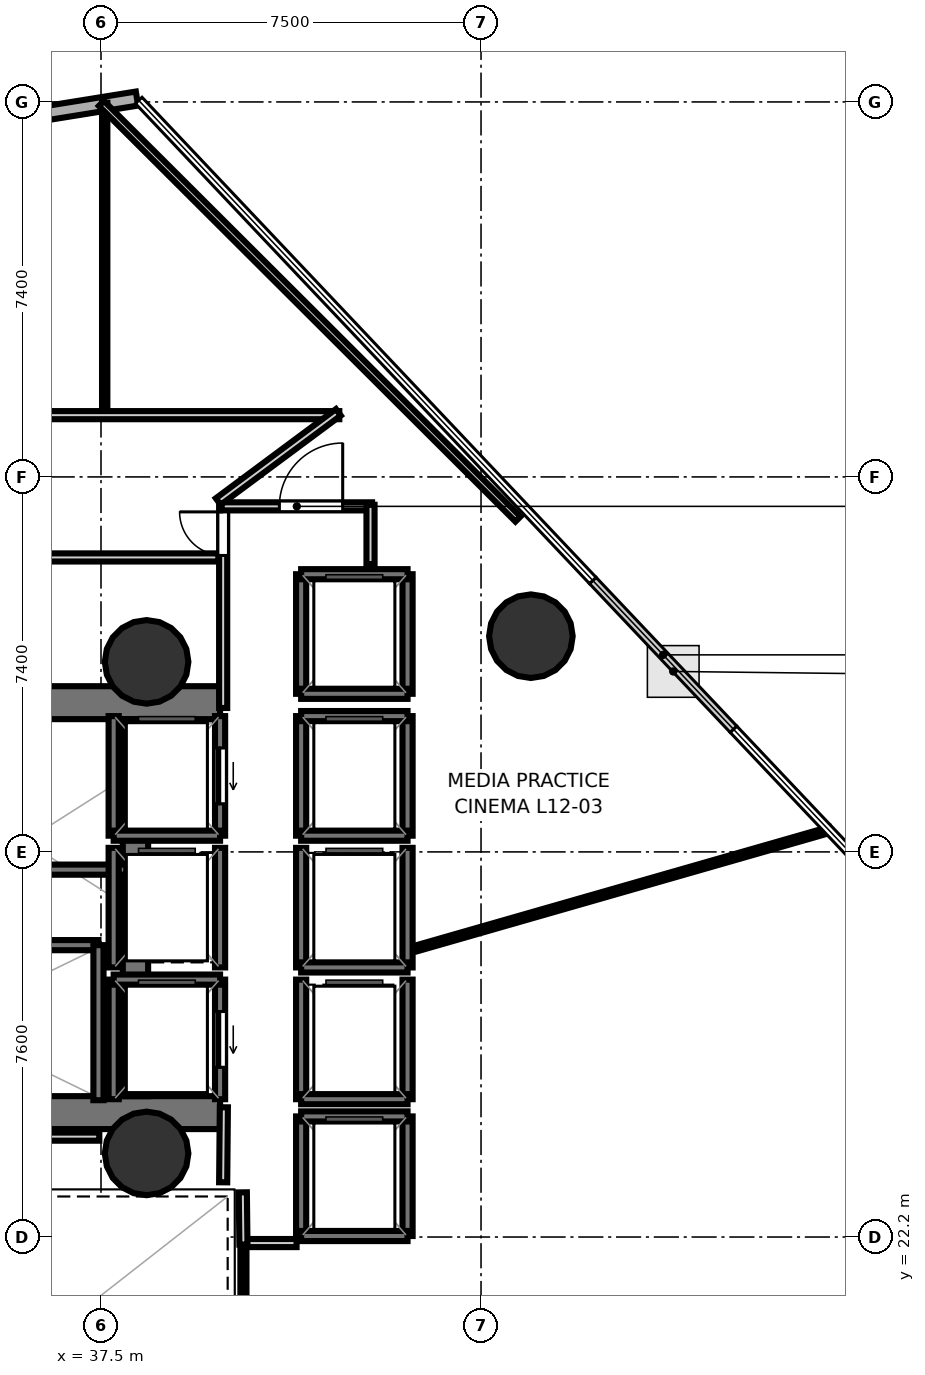
"""IFC4 building model, lengths in metres.
Left out: names, types, materials, properties, quantities, classifications, styles, units other than length and angle.
Written with IfcOpenShell. Run it as: python <this file> out.ifc"""

import sys

from ifc_helpers import new_model, si_unit, direction, frame, frame_2d, origin, origin_2d, place, context, subcontext, project, spatial, rectangle, hollow_circle, extrude, element, fill, save


model = new_model("IFC4")
c1 = context("Model", 3, precision=1e-05, world=origin(), true_north=direction((0.0, 1.0)))
c2 = subcontext(c1, "Body", "Model", "MODEL_VIEW")
j1 = project(units=[si_unit("LENGTHUNIT", "METRE"), si_unit("PLANEANGLEUNIT", "RADIAN")], contexts=[c1])
p1 = place(None, origin())
s1 = spatial("IfcSite", under=j1, at=p1, CompositionType="ELEMENT")
p2 = place(p1, origin())
s2 = spatial("IfcBuilding", under=s1, at=p2, CompositionType="ELEMENT")
p3 = place(p2, frame((0.0, 0.0, 52.5)))
s3 = spatial("IfcBuildingStorey", under=s2, at=p3, CompositionType="ELEMENT", Elevation=52.5)
p4 = place(p3, frame((29.13, 32.745, 0.0), z_axis=(0.0, 0.0, 1.0), x_axis=(1.0, 0.0, 0.0)))
e1 = element("IfcWall", 1, at=p4, inside=s3, PredefinedType="SHEAR", context=c2, shape_type="SweptSolid", body=[
    extrude(rectangle(XDim=10.72, YDim=0.65, at=frame_2d((5.36, 0.0))), origin(), (0.0, 0.0, 1.0), 3.52),
])
p5 = place(p4, frame((1.095, 0.0, 0.0)))
e2 = element("IfcOpeningElement", 2, at=p5, cuts=e1, PredefinedType="OPENING", context=c2, shape_type="SweptSolid", body=[
    extrude(rectangle(XDim=1.25, YDim=2.15, at=frame_2d((0.625, 1.075))), frame((0.0, 0.335, 0.0), z_axis=(0.0, -1.0, 0.0), x_axis=(1.0, 0.0, 0.0)), (0.0, 0.0, 1.0), 0.67),
])
p6 = place(p3, frame((29.13, 24.655, 0.0), z_axis=(0.0, 0.0, 1.0), x_axis=(1.0, 0.0, 0.0)))
e3 = element("IfcWall", 3, at=p6, inside=s3, PredefinedType="SHEAR", context=c2, shape_type="SweptSolid", body=[
    extrude(rectangle(XDim=10.72, YDim=0.65, at=frame_2d((5.36, 0.0))), origin(), (0.0, 0.0, 1.0), 3.52),
])
p7 = place(p6, frame((0.895, 0.0, 0.0)))
e4 = element("IfcOpeningElement", 4, at=p7, cuts=e3, PredefinedType="OPENING", context=c2, shape_type="SweptSolid", body=[
    extrude(rectangle(XDim=1.25, YDim=2.15, at=frame_2d((0.625, 1.075))), frame((0.0, 0.335, 0.0), z_axis=(0.0, -1.0, 0.0), x_axis=(1.0, 0.0, 0.0)), (0.0, 0.0, 1.0), 0.67),
])
p8 = place(p3, frame((38.18, 24.98, 0.0), z_axis=(0.0, 0.0, 1.0), x_axis=(0.0, 1.0, 0.0)))
e5 = element("IfcWall", 5, at=p8, inside=s3, PredefinedType="SHEAR", context=c2, shape_type="SweptSolid", body=[
    extrude(rectangle(XDim=7.44, YDim=0.5, at=frame_2d((3.72, 0.0))), origin(), (0.0, 0.0, 1.0), 3.52),
])
for number, where, z_axis, x_axis in (
    (6, (38.4, 33.55, 0.0), (0.0, 0.0, 1.0), (1.0, 0.0, 0.0)),
    (7, (38.4, 23.85, 0.0), (0.0, 0.0, 1.0), (1.0, 0.0, 0.0)),
):
    element("IfcColumn", number, at=place(p3, frame(where, z_axis=z_axis, x_axis=x_axis)), inside=s3, PredefinedType="COLUMN", context=c2, shape_type="SweptSolid", body=[
        extrude(hollow_circle(Radius=0.825, WallThickness=0.04, at=origin_2d()), origin(), (0.0, 0.0, 1.0), 3.7),
    ])
p9 = place(p3, frame((45.984, 34.057, -0.23), z_axis=(0.0, 0.0, 1.0), x_axis=(1.0, 0.0, 0.0)))
e8 = element("IfcColumn", 8, at=p9, inside=s3, PredefinedType="COLUMN", context=c2, shape_type="SweptSolid", body=[
    extrude(hollow_circle(Radius=0.825, WallThickness=0.04, at=origin_2d()), origin(), (0.0, 0.0, 1.0), 3.93),
])
p10 = place(p3, frame((38.21, 44.667, 0.0), z_axis=(0.0, 0.0, 1.0), x_axis=(-0.987285743685, -0.158955529366, 0.0)))
e9 = element("IfcWall", 9, at=p10, inside=s3, PredefinedType="SOLIDWALL", context=c2, shape_type="SweptSolid", body=[
    extrude(rectangle(XDim=12.668, YDim=0.28, at=frame_2d((6.334, 0.0))), origin(), (0.0, 0.0, 1.0), 3.52),
])
p11 = place(p10, frame((2.9, 0.0, 0.85)))
e10 = element("IfcOpeningElement", 10, at=p11, cuts=e9, PredefinedType="OPENING", context=c2, shape_type="SweptSolid", body=[
    extrude(rectangle(XDim=1.8, YDim=2.1, at=frame_2d((0.9, 1.05))), frame((0.0, 0.15, 0.0), z_axis=(0.0, -1.0, 0.0), x_axis=(1.0, 0.0, 0.0)), (0.0, 0.0, 1.0), 0.3),
])
p12 = place(p10, frame((7.968, 0.0, 0.85)))
e11 = element("IfcOpeningElement", 11, at=p12, cuts=e9, PredefinedType="OPENING", context=c2, shape_type="SweptSolid", body=[
    extrude(rectangle(XDim=1.8, YDim=2.1, at=frame_2d((0.9, 1.05))), frame((0.0, 0.15, 0.0), z_axis=(0.0, -1.0, 0.0), x_axis=(1.0, 0.0, 0.0)), (0.0, 0.0, 1.0), 0.3),
])
p13 = place(p3, frame((29.7, 29.45, 0.0), z_axis=(0.0, 0.0, 1.0), x_axis=(1.0, 0.0, 0.0)))
e12 = element("IfcWall", 12, at=p13, inside=s3, PredefinedType="SOLIDWALL", context=c2, shape_type="SweptSolid", body=[
    extrude(rectangle(XDim=8.3, YDim=0.2, at=frame_2d((4.15, 0.0))), origin(), (0.0, 0.0, 1.0), 3.52),
])
p14 = place(p3, frame((29.7, 27.96, 0.0), z_axis=(0.0, 0.0, 1.0), x_axis=(1.0, 0.0, 0.0)))
e13 = element("IfcWall", 13, at=p14, inside=s3, PredefinedType="SOLIDWALL", context=c2, shape_type="SweptSolid", body=[
    extrude(rectangle(XDim=7.75, YDim=0.2, at=frame_2d((3.875, 0.0))), origin(), (0.0, 0.0, 1.0), 3.52),
])
p15 = place(p3, frame((37.45, 24.9, 0.0), z_axis=(0.0, 0.0, 1.0), x_axis=(0.0, 1.0, 0.0)))
e14 = element("IfcWall", 14, at=p15, inside=s3, PredefinedType="SOLIDWALL", context=c2, shape_type="SweptSolid", body=[
    extrude(rectangle(XDim=3.06, YDim=0.2, at=frame_2d((1.53, 0.0))), origin(), (0.0, 0.0, 1.0), 3.52),
])
p16 = place(p3, frame((39.85, 30.12, 0.0), z_axis=(0.0, 0.0, 1.0), x_axis=(0.0, 1.0, 0.0)))
e15 = element("IfcWall", 15, at=p16, inside=s3, PredefinedType="SOLIDWALL", context=c2, shape_type="SweptSolid", body=[
    extrude(rectangle(XDim=2.36, YDim=0.2, at=frame_2d((1.18, 0.0))), origin(), (0.0, 0.0, 1.0), 3.52),
])
p17 = place(p16, frame((0.63, 0.0, 0.0)))
e16 = element("IfcOpeningElement", 16, at=p17, cuts=e15, PredefinedType="OPENING", context=c2, shape_type="SweptSolid", body=[
    extrude(rectangle(XDim=1.1, YDim=2.15, at=frame_2d((0.55, 1.075))), frame((0.0, 0.11, 0.0), z_axis=(0.0, -1.0, 0.0), x_axis=(1.0, 0.0, 0.0)), (0.0, 0.0, 1.0), 0.22),
])
p18 = place(p3, frame((37.75, 30.12, 0.0), z_axis=(0.0, 0.0, 1.0), x_axis=(0.0, 1.0, 0.0)))
e17 = element("IfcWall", 17, at=p18, inside=s3, PredefinedType="SOLIDWALL", context=c2, shape_type="SweptSolid", body=[
    extrude(rectangle(XDim=2.36, YDim=0.2, at=frame_2d((1.18, 0.0))), origin(), (0.0, 0.0, 1.0), 3.52),
])
p19 = place(p3, frame((37.75, 30.12, 0.0), z_axis=(0.0, 0.0, 1.0), x_axis=(1.0, 0.0, 0.0)))
e18 = element("IfcWall", 18, at=p19, inside=s3, PredefinedType="SOLIDWALL", context=c2, shape_type="SweptSolid", body=[
    extrude(rectangle(XDim=2.1, YDim=0.2, at=frame_2d((1.05, 0.0))), origin(), (0.0, 0.0, 1.0), 3.52),
])
p20 = place(p3, frame((39.85, 24.92, 0.0), z_axis=(0.0, 0.0, 1.0), x_axis=(0.0, 1.0, 0.0)))
e19 = element("IfcWall", 19, at=p20, inside=s3, PredefinedType="SOLIDWALL", context=c2, shape_type="SweptSolid", body=[
    extrude(rectangle(XDim=2.36, YDim=0.2, at=frame_2d((1.18, 0.0))), origin(), (0.0, 0.0, 1.0), 3.52),
])
p21 = place(p20, frame((0.63, 0.0, 0.0)))
e20 = element("IfcOpeningElement", 20, at=p21, cuts=e19, PredefinedType="OPENING", context=c2, shape_type="SweptSolid", body=[
    extrude(rectangle(XDim=1.1, YDim=2.15, at=frame_2d((0.55, 1.075))), frame((0.0, 0.11, 0.0), z_axis=(0.0, -1.0, 0.0), x_axis=(1.0, 0.0, 0.0)), (0.0, 0.0, 1.0), 0.22),
])
p22 = place(p3, frame((37.75, 24.92, 0.0), z_axis=(0.0, 0.0, 1.0), x_axis=(0.0, 1.0, 0.0)))
e21 = element("IfcWall", 21, at=p22, inside=s3, PredefinedType="SOLIDWALL", context=c2, shape_type="SweptSolid", body=[
    extrude(rectangle(XDim=2.36, YDim=0.2, at=frame_2d((1.18, 0.0))), origin(), (0.0, 0.0, 1.0), 3.52),
])
p23 = place(p3, frame((37.75, 27.28, 0.0), z_axis=(0.0, 0.0, 1.0), x_axis=(1.0, 0.0, 0.0)))
e22 = element("IfcWall", 22, at=p23, inside=s3, PredefinedType="SOLIDWALL", context=c2, shape_type="SweptSolid", body=[
    extrude(rectangle(XDim=2.1, YDim=0.2, at=frame_2d((1.05, 0.0))), origin(), (0.0, 0.0, 1.0), 3.52),
])
for number, where, z_axis, x_axis in (
    (23, (43.55, 30.12, 0.0), (0.0, 0.0, 1.0), (0.0, 1.0, 0.0)),
    (24, (41.45, 30.12, 0.0), (0.0, 0.0, 1.0), (0.0, 1.0, 0.0)),
):
    element("IfcWall", number, at=place(p3, frame(where, z_axis=z_axis, x_axis=x_axis)), inside=s3, PredefinedType="SOLIDWALL", context=c2, shape_type="SweptSolid", body=[
        extrude(rectangle(XDim=2.36, YDim=0.2, at=frame_2d((1.18, 0.0))), origin(), (0.0, 0.0, 1.0), 3.52),
    ])
for number, where, z_axis, x_axis in (
    (25, (41.45, 32.48, 0.0), (0.0, 0.0, 1.0), (1.0, 0.0, 0.0)),
    (26, (41.45, 30.12, 0.0), (0.0, 0.0, 1.0), (1.0, 0.0, 0.0)),
):
    element("IfcWall", number, at=place(p3, frame(where, z_axis=z_axis, x_axis=x_axis)), inside=s3, PredefinedType="SOLIDWALL", context=c2, shape_type="SweptSolid", body=[
        extrude(rectangle(XDim=2.1, YDim=0.2, at=frame_2d((1.05, 0.0))), origin(), (0.0, 0.0, 1.0), 3.52),
    ])
for number, where, z_axis, x_axis in (
    (27, (43.55, 27.52, 0.0), (0.0, 0.0, 1.0), (0.0, 1.0, 0.0)),
    (28, (41.45, 27.52, 0.0), (0.0, 0.0, 1.0), (0.0, 1.0, 0.0)),
):
    element("IfcWall", number, at=place(p3, frame(where, z_axis=z_axis, x_axis=x_axis)), inside=s3, PredefinedType="SOLIDWALL", context=c2, shape_type="SweptSolid", body=[
        extrude(rectangle(XDim=2.36, YDim=0.2, at=frame_2d((1.18, 0.0))), origin(), (0.0, 0.0, 1.0), 3.52),
    ])
p24 = place(p3, frame((41.45, 27.52, 0.0), z_axis=(0.0, 0.0, 1.0), x_axis=(1.0, 0.0, 0.0)))
e29 = element("IfcWall", 29, at=p24, inside=s3, PredefinedType="SOLIDWALL", context=c2, shape_type="SweptSolid", body=[
    extrude(rectangle(XDim=2.1, YDim=0.2, at=frame_2d((1.05, 0.0))), origin(), (0.0, 0.0, 1.0), 3.52),
])
for number, where, z_axis, x_axis in (
    (30, (43.55, 24.92, 0.0), (0.0, 0.0, 1.0), (0.0, 1.0, 0.0)),
    (31, (41.45, 24.92, 0.0), (0.0, 0.0, 1.0), (0.0, 1.0, 0.0)),
):
    element("IfcWall", number, at=place(p3, frame(where, z_axis=z_axis, x_axis=x_axis)), inside=s3, PredefinedType="SOLIDWALL", context=c2, shape_type="SweptSolid", body=[
        extrude(rectangle(XDim=2.36, YDim=0.2, at=frame_2d((1.18, 0.0))), origin(), (0.0, 0.0, 1.0), 3.52),
    ])
p25 = place(p3, frame((41.45, 24.92, 0.0), z_axis=(0.0, 0.0, 1.0), x_axis=(1.0, 0.0, 0.0)))
e32 = element("IfcWall", 32, at=p25, inside=s3, PredefinedType="SOLIDWALL", context=c2, shape_type="SweptSolid", body=[
    extrude(rectangle(XDim=2.1, YDim=0.2, at=frame_2d((1.05, 0.0))), origin(), (0.0, 0.0, 1.0), 3.52),
])
for number, where, z_axis, x_axis in (
    (33, (39.85, 27.52, 0.0), (0.0, 0.0, 1.0), (0.0, 1.0, 0.0)),
    (34, (37.75, 27.52, 0.0), (0.0, 0.0, 1.0), (0.0, 1.0, 0.0)),
):
    element("IfcWall", number, at=place(p3, frame(where, z_axis=z_axis, x_axis=x_axis)), inside=s3, PredefinedType="SOLIDWALL", context=c2, shape_type="SweptSolid", body=[
        extrude(rectangle(XDim=2.36, YDim=0.2, at=frame_2d((1.18, 0.0))), origin(), (0.0, 0.0, 1.0), 3.52),
    ])
for number, where, z_axis, x_axis in (
    (35, (43.55, 22.22, 0.0), (0.0, 0.0, 1.0), (0.0, 1.0, 0.0)),
    (36, (41.45, 22.22, 0.0), (0.0, 0.0, 1.0), (0.0, 1.0, 0.0)),
):
    element("IfcWall", number, at=place(p3, frame(where, z_axis=z_axis, x_axis=x_axis)), inside=s3, PredefinedType="SOLIDWALL", context=c2, shape_type="SweptSolid", body=[
        extrude(rectangle(XDim=2.36, YDim=0.2, at=frame_2d((1.18, 0.0))), origin(), (0.0, 0.0, 1.0), 3.52),
    ])
for number, where, z_axis, x_axis in (
    (37, (41.45, 24.58, 0.0), (0.0, 0.0, 1.0), (1.0, 0.0, 0.0)),
    (38, (41.45, 22.22, 0.0), (0.0, 0.0, 1.0), (1.0, 0.0, 0.0)),
):
    element("IfcWall", number, at=place(p3, frame(where, z_axis=z_axis, x_axis=x_axis)), inside=s3, PredefinedType="SOLIDWALL", context=c2, shape_type="SweptSolid", body=[
        extrude(rectangle(XDim=2.1, YDim=0.2, at=frame_2d((1.05, 0.0))), origin(), (0.0, 0.0, 1.0), 3.52),
    ])
for number, where, z_axis, x_axis in (
    (39, (43.55, 32.92, 0.0), (0.0, 0.0, 1.0), (0.0, 1.0, 0.0)),
    (40, (41.45, 32.92, 0.0), (0.0, 0.0, 1.0), (0.0, 1.0, 0.0)),
):
    element("IfcWall", number, at=place(p3, frame(where, z_axis=z_axis, x_axis=x_axis)), inside=s3, PredefinedType="SOLIDWALL", context=c2, shape_type="SweptSolid", body=[
        extrude(rectangle(XDim=2.36, YDim=0.2, at=frame_2d((1.18, 0.0))), origin(), (0.0, 0.0, 1.0), 3.52),
    ])
for number, where, z_axis, x_axis in (
    (41, (41.45, 35.28, 0.0), (0.0, 0.0, 1.0), (1.0, 0.0, 0.0)),
    (42, (41.45, 32.92, 0.0), (0.0, 0.0, 1.0), (1.0, 0.0, 0.0)),
):
    element("IfcWall", number, at=place(p3, frame(where, z_axis=z_axis, x_axis=x_axis)), inside=s3, PredefinedType="SOLIDWALL", context=c2, shape_type="SweptSolid", body=[
        extrude(rectangle(XDim=2.1, YDim=0.2, at=frame_2d((1.05, 0.0))), origin(), (0.0, 0.0, 1.0), 3.52),
    ])
p26 = place(p3, frame((39.911, 32.64, 0.0), z_axis=(0.0, 0.0, 1.0), x_axis=(0.0, 1.0, 0.0)))
e43 = element("IfcWall", 43, at=p26, inside=s3, PredefinedType="PARTITIONING", context=c2, shape_type="SweptSolid", body=[
    extrude(rectangle(XDim=4.01, YDim=0.16, at=frame_2d((2.005, 0.0))), origin(), (0.0, 0.0, 1.0), 2.84),
])
p27 = place(p26, frame((3.01, 0.0, 0.0)))
e44 = element("IfcOpeningElement", 44, at=p27, cuts=e43, PredefinedType="OPENING", context=c2, shape_type="SweptSolid", body=[
    extrude(rectangle(XDim=0.86, YDim=2.05, at=frame_2d((0.43, 1.025))), frame((0.0, 0.09, 0.0), z_axis=(0.0, -1.0, 0.0), x_axis=(1.0, 0.0, 0.0)), (0.0, 0.0, 1.0), 0.18),
])
p28 = place(p3, frame((39.88, 36.619, 0.0), z_axis=(0.0, 0.0, 1.0), x_axis=(1.0, 0.0, 0.0)))
e45 = element("IfcWall", 45, at=p28, inside=s3, PredefinedType="PARTITIONING", context=c2, shape_type="SweptSolid", body=[
    extrude(rectangle(XDim=2.97, YDim=0.16, at=frame_2d((1.485, 0.0))), origin(), (0.0, 0.0, 1.0), 2.798),
])
p29 = place(p28, frame((1.14, 0.0, 0.0)))
e46 = element("IfcOpeningElement", 46, at=p29, cuts=e45, PredefinedType="OPENING", context=c2, shape_type="SweptSolid", body=[
    extrude(rectangle(XDim=1.25, YDim=2.2, at=frame_2d((0.625, 1.1))), frame((0.0, 0.09, 0.0), z_axis=(0.0, -1.0, 0.0), x_axis=(1.0, 0.0, 0.0)), (0.0, 0.0, 1.0), 0.18),
])
p30 = place(p3, frame((42.819, 36.65, 0.0), z_axis=(0.0, 0.0, 1.0), x_axis=(0.0, -1.0, 0.0)))
e47 = element("IfcWall", 47, at=p30, inside=s3, PredefinedType="PARTITIONING", context=c2, shape_type="SweptSolid", body=[
    extrude(rectangle(XDim=1.17, YDim=0.16, at=frame_2d((0.585, 0.0))), origin(), (0.0, 0.0, 1.0), 2.798),
])
p31 = place(p3, frame((41.36, 22.081, 0.0), z_axis=(0.0, 0.0, 1.0), x_axis=(-1.0, 0.0, 0.0)))
e48 = element("IfcWall", 48, at=p31, inside=s3, PredefinedType="PARTITIONING", context=c2, shape_type="SweptSolid", body=[
    extrude(rectangle(XDim=1.08, YDim=0.16, at=frame_2d((0.54, 0.0))), origin(), (0.0, 0.0, 1.0), 2.84),
])
p32 = place(p3, frame((40.311, 22.05, 0.0), z_axis=(0.0, 0.0, 1.0), x_axis=(-0.011836292006, 0.999929948642, 0.0)))
e49 = element("IfcWall", 49, at=p32, inside=s3, PredefinedType="PARTITIONING", context=c2, shape_type="SweptSolid", body=[
    extrude(rectangle(XDim=1.031, YDim=0.16, at=frame_2d((0.516, 0.0))), origin(), (0.0, 0.0, 1.0), 2.84),
])
p33 = place(p3, frame((39.911, 23.28, 0.0), z_axis=(0.0, 0.0, 1.0), x_axis=(0.009397771291, 0.999955839972, 0.0)))
e50 = element("IfcWall", 50, at=p33, inside=s3, PredefinedType="PARTITIONING", context=c2, shape_type="SweptSolid", body=[
    extrude(rectangle(XDim=1.481, YDim=0.16, at=frame_2d((0.74, 0.0))), origin(), (0.0, 0.0, 1.0), 2.84),
])
p34 = place(p3, frame((37.467, 24.181, 0.0), z_axis=(0.0, 0.0, 1.0), x_axis=(-1.0, 0.0, 0.0)))
e51 = element("IfcWall", 51, at=p34, inside=s3, PredefinedType="PARTITIONING", context=c2, shape_type="SweptSolid", body=[
    extrude(rectangle(XDim=3.937, YDim=0.16, at=frame_2d((1.968, 0.0))), origin(), (0.0, 0.0, 1.0), 2.84),
])
p35 = place(p3, frame((26.42, 38.419, 0.0), z_axis=(0.0, 0.0, 1.0), x_axis=(1.0, 0.0, 0.0)))
e52 = element("IfcWall", 52, at=p35, inside=s3, PredefinedType="PARTITIONING", context=c2, shape_type="SweptSolid", body=[
    extrude(rectangle(XDim=15.783, YDim=0.16, at=frame_2d((7.892, 0.0))), origin(), (0.0, 0.0, 1.0), 2.798),
])
p36 = place(p35, frame((5.544, 0.0, 0.0)))
e53 = element("IfcOpeningElement", 53, at=p36, cuts=e52, PredefinedType="OPENING", context=c2, shape_type="SweptSolid", body=[
    extrude(rectangle(XDim=1.25, YDim=2.2, at=frame_2d((0.625, 1.1))), frame((0.0, 0.09, 0.0), z_axis=(0.0, -1.0, 0.0), x_axis=(1.0, 0.0, 0.0)), (0.0, 0.0, 1.0), 0.18),
])
p37 = place(p3, frame((42.185, 38.475, 0.0), z_axis=(0.0, 0.0, 1.0), x_axis=(-0.802818467394, -0.596223538961, 0.0)))
e54 = element("IfcWall", 54, at=p37, inside=s3, PredefinedType="PARTITIONING", context=c2, shape_type="SweptSolid", body=[
    extrude(rectangle(XDim=2.953, YDim=0.16, at=frame_2d((1.477, 0.0))), origin(), (0.0, 0.0, 1.0), 2.798),
])
p38 = place(p3, frame((39.818, 35.611, 0.0), z_axis=(0.0, 0.0, 1.0), x_axis=(-1.0, 0.0, 0.0)))
e55 = element("IfcWall", 55, at=p38, inside=s3, PredefinedType="PARTITIONING", context=c2, shape_type="SweptSolid", body=[
    extrude(rectangle(XDim=5.318, YDim=0.16, at=frame_2d((2.659, 0.0))), origin(), (0.0, 0.0, 1.0), 2.84),
])
p39 = place(p3, frame((40.311, 18.0, 0.0), z_axis=(0.0, 0.0, 1.0), x_axis=(0.0, 1.0, 0.0)))
e56 = element("IfcWall", 56, at=p39, inside=s3, PredefinedType="PARTITIONING", context=c2, shape_type="SweptSolid", body=[
    extrude(rectangle(XDim=3.97, YDim=0.12, at=frame_2d((1.985, 0.0))), origin(), (0.0, 0.0, 1.0), 2.84),
])
p40 = place(p3, frame((43.729, 27.897, 0.0), z_axis=(0.0, 0.0, 1.0), x_axis=(0.961259634344, 0.275644545349, 0.0)))
e57 = element("IfcWall", 57, at=p40, inside=s3, PredefinedType="PARTITIONING", context=c2, shape_type="SweptSolid", body=[
    extrude(rectangle(XDim=8.484, YDim=0.12, at=frame_2d((4.242, 0.0))), origin(), (0.0, 0.0, 1.0), 2.798),
])
p41 = place(p3, frame((37.573, 38.53, 0.0), z_axis=(0.0, 0.0, 1.0), x_axis=(0.0, 1.0, 0.0)))
e58 = element("IfcWall", 58, at=p41, inside=s3, PredefinedType="PARTITIONING", context=c2, shape_type="SweptSolid", body=[
    extrude(rectangle(XDim=6.054, YDim=0.105, at=frame_2d((3.027, 0.0))), origin(), (0.0, 0.0, 1.0), 2.798),
])
p42 = place(p3, frame((37.508, 44.57, 0.0), z_axis=(0.0, 0.0, 1.0), x_axis=(0.707905248795, -0.706307410926, 0.0)))
e59 = element("IfcWall", 59, at=p42, inside=s3, PredefinedType="PARTITIONING", context=c2, shape_type="SweptSolid", body=[
    extrude(rectangle(XDim=11.612, YDim=0.14, at=frame_2d((5.806, 0.0))), origin(), (0.0, 0.0, 1.0), 2.84),
])
p43 = place(p17, origin())
e60 = element("IfcDoor", 60, at=p43, inside=s3, OperationType="SLIDING_TO_LEFT", PredefinedType="DOOR", context=c2, shape_type="SweptSolid", body=[
    extrude(rectangle(XDim=1.1, YDim=2.15, at=frame_2d((0.55, 1.075))), frame((0.0, 0.025, 0.0), z_axis=(0.0, -1.0, 0.0), x_axis=(1.0, 0.0, 0.0)), (0.0, 0.0, 1.0), 0.05),
])
fill(e16, e60)
p44 = place(p21, origin())
e61 = element("IfcDoor", 61, at=p44, inside=s3, OperationType="SLIDING_TO_LEFT", PredefinedType="DOOR", context=c2, shape_type="SweptSolid", body=[
    extrude(rectangle(XDim=1.1, YDim=2.15, at=frame_2d((0.55, 1.075))), frame((0.0, 0.025, 0.0), z_axis=(0.0, -1.0, 0.0), x_axis=(1.0, 0.0, 0.0)), (0.0, 0.0, 1.0), 0.05),
])
fill(e20, e61)
p45 = place(p27, origin())
e62 = element("IfcDoor", 62, at=p45, inside=s3, OperationType="SINGLE_SWING_RIGHT", PredefinedType="DOOR", context=c2, shape_type="SweptSolid", body=[
    extrude(rectangle(XDim=0.86, YDim=2.05, at=frame_2d((0.43, 1.025))), frame((0.0, 0.025, 0.0), z_axis=(0.0, -1.0, 0.0), x_axis=(1.0, 0.0, 0.0)), (0.0, 0.0, 1.0), 0.05),
])
fill(e44, e62)
p46 = place(p29, origin())
e63 = element("IfcDoor", 63, at=p46, inside=s3, OperationType="SINGLE_SWING_RIGHT", PredefinedType="DOOR", context=c2, shape_type="SweptSolid", body=[
    extrude(rectangle(XDim=1.25, YDim=2.2, at=frame_2d((0.625, 1.1))), frame((0.0, 0.025, 0.0), z_axis=(0.0, -1.0, 0.0), x_axis=(1.0, 0.0, 0.0)), (0.0, 0.0, 1.0), 0.05),
])
fill(e46, e63)
save(model, sys.argv[1])
